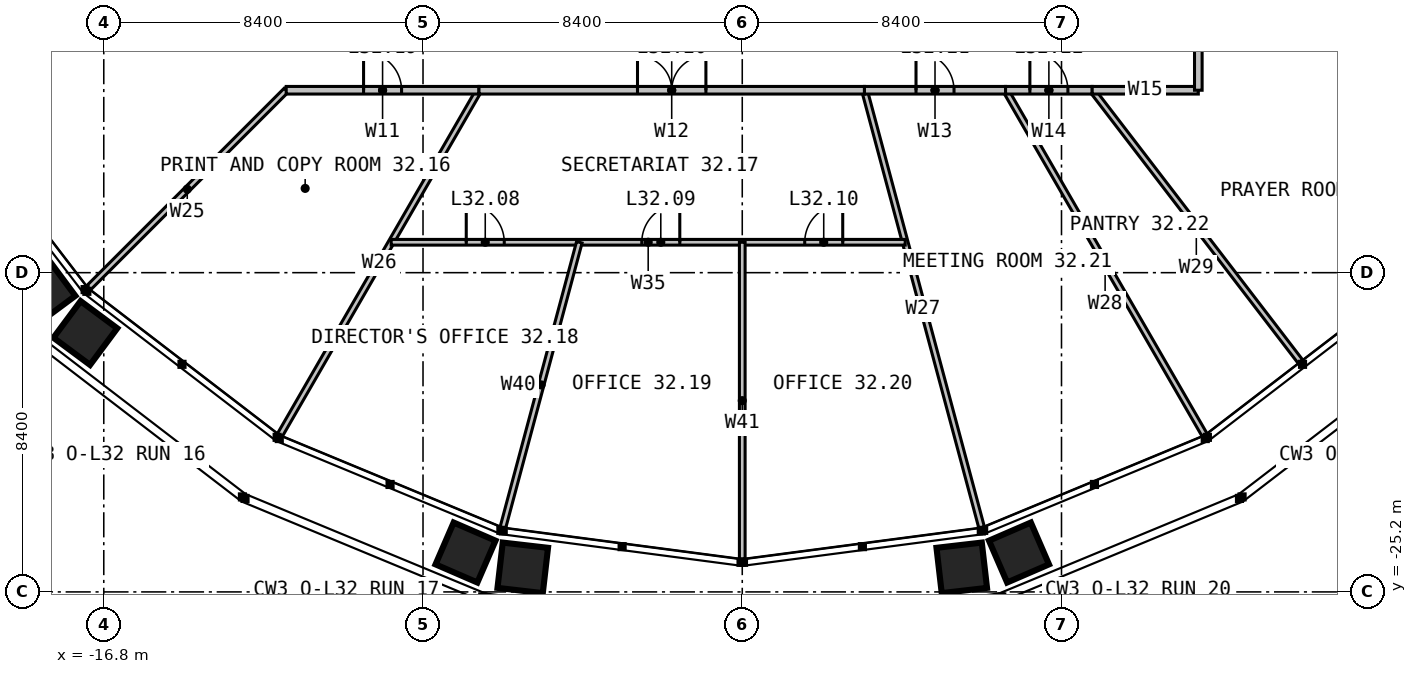
"""IFC4 building model, lengths in metres.
Left out: names, types, materials, properties, quantities, classifications, styles, units other than length and angle.
Written with IfcOpenShell. Run it as: python <this file> out.ifc"""

import sys

from ifc_helpers import new_model, si_unit, direction, frame, frame_2d, origin, place, context, subcontext, project, spatial, rectangle, extrude, element, fill, save


model = new_model("IFC4")
c1 = context("Model", 3, precision=1e-05, world=origin(), true_north=direction((0.0, 1.0)))
c2 = subcontext(c1, "Body", "Model", "MODEL_VIEW")
j1 = project(units=[si_unit("LENGTHUNIT", "METRE"), si_unit("PLANEANGLEUNIT", "RADIAN")], contexts=[c1])
p1 = place(None, origin())
s1 = spatial("IfcSite", under=j1, at=p1, CompositionType="ELEMENT")
p2 = place(p1, origin())
s2 = spatial("IfcBuilding", under=s1, at=p2, CompositionType="ELEMENT")
p3 = place(p2, frame((0.0, 0.0, 134.0)))
s3 = spatial("IfcBuildingStorey", under=s2, at=p3, CompositionType="ELEMENT", Elevation=134.0)
for number, where, z_axis, x_axis in (
    (1, (12.0, -6.928, 0.0), (0.0, 0.0, 1.0), (0.866, -0.5, 0.0)),
    (2, (-12.0, -6.928, 0.0), (0.0, 0.0, 1.0), (-0.866, -0.5, 0.0)),
):
    element("IfcWall", number, at=place(p3, frame(where, z_axis=z_axis, x_axis=x_axis)), inside=s3, PredefinedType="PARTITIONING", context=c2, shape_type="SweptSolid", body=[
        extrude(rectangle(XDim=10.478, YDim=0.15, at=frame_2d((5.239, 0.0))), origin(), (0.0, 0.0, 1.0), 2.79),
    ])
p4 = place(p3, frame((-12.0, -12.0, 0.0), z_axis=(0.0, 0.0, 1.0), x_axis=(-0.707106781187, -0.707106781187, 0.0)))
e3 = element("IfcWall", 3, at=p4, inside=s3, PredefinedType="PARTITIONING", context=c2, shape_type="SweptSolid", body=[
    extrude(rectangle(XDim=7.364, YDim=0.15, at=frame_2d((3.682, 0.0))), origin(), (0.0, 0.0, 1.0), 2.79),
])
p5 = place(p3, frame((-6.928, -12.0, 0.0), z_axis=(0.0, 0.0, 1.0), x_axis=(-0.49999340367, -0.866029212144, 0.0)))
e4 = element("IfcWall", 4, at=p5, inside=s3, PredefinedType="PARTITIONING", context=c2, shape_type="SweptSolid", body=[
    extrude(rectangle(XDim=10.478, YDim=0.15, at=frame_2d((5.239, 0.0))), origin(), (0.0, 0.0, 1.0), 2.79),
])
p6 = place(p3, frame((3.215, -12.0, 0.0), z_axis=(0.0, 0.0, 1.0), x_axis=(0.258817023816, -0.965926367889, 0.0)))
e5 = element("IfcWall", 5, at=p6, inside=s3, PredefinedType="PARTITIONING", context=c2, shape_type="SweptSolid", body=[
    extrude(rectangle(XDim=11.911, YDim=0.15, at=frame_2d((5.956, 0.0))), origin(), (0.0, 0.0, 1.0), 2.79),
])
p7 = place(p3, frame((6.928, -12.0, 0.0), z_axis=(0.0, 0.0, 1.0), x_axis=(0.49999340367, -0.866029212144, 0.0)))
e6 = element("IfcWall", 6, at=p7, inside=s3, PredefinedType="PARTITIONING", context=c2, shape_type="SweptSolid", body=[
    extrude(rectangle(XDim=10.478, YDim=0.15, at=frame_2d((5.239, 0.0))), origin(), (0.0, 0.0, 1.0), 2.79),
])
p8 = place(p3, frame((9.208, -12.0, 0.0), z_axis=(0.0, 0.0, 1.0), x_axis=(0.608761217002, -0.79335350297, 0.0)))
e7 = element("IfcWall", 7, at=p8, inside=s3, PredefinedType="PARTITIONING", context=c2, shape_type="SweptSolid", body=[
    extrude(rectangle(XDim=9.0, YDim=0.15, at=frame_2d((4.5, 0.0))), origin(), (0.0, 0.0, 1.0), 2.79),
])
p9 = place(p3, frame((-12.0, -12.0, 0.0), z_axis=(0.0, 0.0, 1.0), x_axis=(1.0, 0.0, 0.0)))
e8 = element("IfcWall", 8, at=p9, inside=s3, PredefinedType="PARTITIONING", context=c2, shape_type="SweptSolid", body=[
    extrude(rectangle(XDim=5.072, YDim=0.2, at=frame_2d((2.536, 0.0))), origin(), (0.0, 0.0, 1.0), 3.8),
])
p10 = place(p9, frame((2.036, 0.0, 0.0)))
e9 = element("IfcOpeningElement", 9, at=p10, cuts=e8, PredefinedType="OPENING", context=c2, shape_type="SweptSolid", body=[
    extrude(rectangle(XDim=1.0, YDim=2.2, at=frame_2d((0.5, 1.1))), frame((0.0, 0.11, 0.0), z_axis=(0.0, -1.0, 0.0), x_axis=(1.0, 0.0, 0.0)), (0.0, 0.0, 1.0), 0.22),
])
p11 = place(p3, frame((-9.238, -16.0, 0.0), z_axis=(0.0, 0.0, 1.0), x_axis=(1.0, 0.0, 0.0)))
e10 = element("IfcWall", 10, at=p11, inside=s3, PredefinedType="PARTITIONING", context=c2, shape_type="SweptSolid", body=[
    extrude(rectangle(XDim=13.525, YDim=0.15, at=frame_2d((6.762, 0.0))), origin(), (0.0, 0.0, 1.0), 2.79),
])
p12 = place(p11, frame((1.975, 0.0, 0.0)))
e11 = element("IfcOpeningElement", 11, at=p12, cuts=e10, PredefinedType="OPENING", context=c2, shape_type="SweptSolid", body=[
    extrude(rectangle(XDim=1.0, YDim=2.2, at=frame_2d((0.5, 1.1))), frame((0.0, 0.085, 0.0), z_axis=(0.0, -1.0, 0.0), x_axis=(1.0, 0.0, 0.0)), (0.0, 0.0, 1.0), 0.17),
])
p13 = place(p11, frame((6.594, 0.0, 0.0)))
e12 = element("IfcOpeningElement", 12, at=p13, cuts=e10, PredefinedType="OPENING", context=c2, shape_type="SweptSolid", body=[
    extrude(rectangle(XDim=1.0, YDim=2.2, at=frame_2d((0.5, 1.1))), frame((0.0, 0.085, 0.0), z_axis=(0.0, -1.0, 0.0), x_axis=(1.0, 0.0, 0.0)), (0.0, 0.0, 1.0), 0.17),
])
p14 = place(p11, frame((10.881, 0.0, 0.0)))
e13 = element("IfcOpeningElement", 13, at=p14, cuts=e10, PredefinedType="OPENING", context=c2, shape_type="SweptSolid", body=[
    extrude(rectangle(XDim=1.0, YDim=2.2, at=frame_2d((0.5, 1.1))), frame((0.0, 0.085, 0.0), z_axis=(0.0, -1.0, 0.0), x_axis=(1.0, 0.0, 0.0)), (0.0, 0.0, 1.0), 0.17),
])
p15 = place(p3, frame((-4.287, -16.0, 0.0), z_axis=(0.0, 0.0, 1.0), x_axis=(-0.25881827922, -0.965926031506, 0.0)))
e14 = element("IfcWall", 14, at=p15, inside=s3, PredefinedType="PARTITIONING", context=c2, shape_type="SweptSolid", body=[
    extrude(rectangle(XDim=7.77, YDim=0.15, at=frame_2d((3.885, 0.0))), origin(), (0.0, 0.0, 1.0), 2.79),
])
p16 = place(p3, frame((0.0, -16.0, 0.0), z_axis=(0.0, 0.0, 1.0), x_axis=(0.0, -1.0, 0.0)))
e15 = element("IfcWall", 15, at=p16, inside=s3, PredefinedType="PARTITIONING", context=c2, shape_type="SweptSolid", body=[
    extrude(rectangle(XDim=8.334, YDim=0.15, at=frame_2d((4.167, 0.0))), origin(), (0.0, 0.0, 1.0), 2.79),
])
p17 = place(p3, frame((-6.928, -12.0, 0.0), z_axis=(0.0, 0.0, 1.0), x_axis=(1.0, 0.0, 0.0)))
e16 = element("IfcWall", 16, at=p17, inside=s3, PredefinedType="PARTITIONING", context=c2, shape_type="SweptSolid", body=[
    extrude(rectangle(XDim=10.144, YDim=0.2, at=frame_2d((5.072, 0.0))), origin(), (0.0, 0.0, 1.0), 3.8),
])
p18 = place(p17, frame((4.172, 0.0, 0.0)))
e17 = element("IfcOpeningElement", 17, at=p18, cuts=e16, PredefinedType="OPENING", context=c2, shape_type="SweptSolid", body=[
    extrude(rectangle(XDim=1.8, YDim=2.2, at=frame_2d((0.9, 1.1))), frame((0.0, 0.11, 0.0), z_axis=(0.0, -1.0, 0.0), x_axis=(1.0, 0.0, 0.0)), (0.0, 0.0, 1.0), 0.22),
])
p19 = place(p3, frame((3.215, -12.0, 0.0), z_axis=(0.0, 0.0, 1.0), x_axis=(1.0, 0.0, 0.0)))
e18 = element("IfcWall", 18, at=p19, inside=s3, PredefinedType="PARTITIONING", context=c2, shape_type="SweptSolid", body=[
    extrude(rectangle(XDim=3.713, YDim=0.2, at=frame_2d((1.856, 0.0))), origin(), (0.0, 0.0, 1.0), 3.8),
])
p20 = place(p19, frame((1.356, 0.0, 0.0)))
e19 = element("IfcOpeningElement", 19, at=p20, cuts=e18, PredefinedType="OPENING", context=c2, shape_type="SweptSolid", body=[
    extrude(rectangle(XDim=1.0, YDim=2.2, at=frame_2d((0.5, 1.1))), frame((0.0, 0.11, 0.0), z_axis=(0.0, -1.0, 0.0), x_axis=(1.0, 0.0, 0.0)), (0.0, 0.0, 1.0), 0.22),
])
p21 = place(p3, frame((6.928, -12.0, 0.0), z_axis=(0.0, 0.0, 1.0), x_axis=(1.0, 0.0, 0.0)))
e20 = element("IfcWall", 20, at=p21, inside=s3, PredefinedType="PARTITIONING", context=c2, shape_type="SweptSolid", body=[
    extrude(rectangle(XDim=2.28, YDim=0.2, at=frame_2d((1.14, 0.0))), origin(), (0.0, 0.0, 1.0), 3.8),
])
p22 = place(p21, frame((0.64, 0.0, 0.0)))
e21 = element("IfcOpeningElement", 21, at=p22, cuts=e20, PredefinedType="OPENING", context=c2, shape_type="SweptSolid", body=[
    extrude(rectangle(XDim=1.0, YDim=2.2, at=frame_2d((0.5, 1.1))), frame((0.0, 0.11, 0.0), z_axis=(0.0, -1.0, 0.0), x_axis=(1.0, 0.0, 0.0)), (0.0, 0.0, 1.0), 0.22),
])
p23 = place(p3, frame((9.208, -12.0, 0.0), z_axis=(0.0, 0.0, 1.0), x_axis=(1.0, 0.0, 0.0)))
e22 = element("IfcWall", 22, at=p23, inside=s3, PredefinedType="PARTITIONING", context=c2, shape_type="SweptSolid", body=[
    extrude(rectangle(XDim=2.792, YDim=0.2, at=frame_2d((1.396, 0.0))), origin(), (0.0, 0.0, 1.0), 3.8),
])
p24 = place(p3, frame((12.0, -12.0, 0.0), z_axis=(0.0, 0.0, 1.0), x_axis=(0.0, 1.0, 0.0)))
e23 = element("IfcWall", 23, at=p24, inside=s3, PredefinedType="PARTITIONING", context=c2, shape_type="SweptSolid", body=[
    extrude(rectangle(XDim=5.072, YDim=0.2, at=frame_2d((2.536, 0.0))), origin(), (0.0, 0.0, 1.0), 3.8),
])
p25 = place(p24, frame((2.036, 0.0, 0.0)))
e24 = element("IfcOpeningElement", 24, at=p25, cuts=e23, PredefinedType="OPENING", context=c2, shape_type="SweptSolid", body=[
    extrude(rectangle(XDim=1.0, YDim=2.2, at=frame_2d((0.5, 1.1))), frame((0.0, 0.11, 0.0), z_axis=(0.0, -1.0, 0.0), x_axis=(1.0, 0.0, 0.0)), (0.0, 0.0, 1.0), 0.22),
])
p26 = place(p10, origin())
e25 = element("IfcDoor", 25, at=p26, inside=s3, OperationType="SINGLE_SWING_LEFT", PredefinedType="DOOR", context=c2, shape_type="SweptSolid", body=[
    extrude(rectangle(XDim=1.0, YDim=2.2, at=frame_2d((0.5, 1.1))), frame((0.0, 0.025, 0.0), z_axis=(0.0, -1.0, 0.0), x_axis=(1.0, 0.0, 0.0)), (0.0, 0.0, 1.0), 0.05),
])
fill(e9, e25)
p27 = place(p12, origin())
e26 = element("IfcDoor", 26, at=p27, inside=s3, OperationType="SINGLE_SWING_LEFT", PredefinedType="DOOR", context=c2, shape_type="SweptSolid", body=[
    extrude(rectangle(XDim=1.0, YDim=2.2, at=frame_2d((0.5, 1.1))), frame((0.0, 0.025, 0.0), z_axis=(0.0, -1.0, 0.0), x_axis=(1.0, 0.0, 0.0)), (0.0, 0.0, 1.0), 0.05),
])
fill(e11, e26)
p28 = place(p13, origin())
e27 = element("IfcDoor", 27, at=p28, inside=s3, OperationType="SINGLE_SWING_RIGHT", PredefinedType="DOOR", context=c2, shape_type="SweptSolid", body=[
    extrude(rectangle(XDim=1.0, YDim=2.2, at=frame_2d((0.5, 1.1))), frame((0.0, 0.025, 0.0), z_axis=(0.0, -1.0, 0.0), x_axis=(1.0, 0.0, 0.0)), (0.0, 0.0, 1.0), 0.05),
])
fill(e12, e27)
p29 = place(p14, origin())
e28 = element("IfcDoor", 28, at=p29, inside=s3, OperationType="SINGLE_SWING_RIGHT", PredefinedType="DOOR", context=c2, shape_type="SweptSolid", body=[
    extrude(rectangle(XDim=1.0, YDim=2.2, at=frame_2d((0.5, 1.1))), frame((0.0, 0.025, 0.0), z_axis=(0.0, -1.0, 0.0), x_axis=(1.0, 0.0, 0.0)), (0.0, 0.0, 1.0), 0.05),
])
fill(e13, e28)
p30 = place(p18, origin())
e29 = element("IfcDoor", 29, at=p30, inside=s3, OperationType="DOUBLE_DOOR_SINGLE_SWING", PredefinedType="DOOR", context=c2, shape_type="SweptSolid", body=[
    extrude(rectangle(XDim=1.8, YDim=2.2, at=frame_2d((0.9, 1.1))), frame((0.0, 0.025, 0.0), z_axis=(0.0, -1.0, 0.0), x_axis=(1.0, 0.0, 0.0)), (0.0, 0.0, 1.0), 0.05),
])
fill(e17, e29)
p31 = place(p20, origin())
e30 = element("IfcDoor", 30, at=p31, inside=s3, OperationType="SINGLE_SWING_LEFT", PredefinedType="DOOR", context=c2, shape_type="SweptSolid", body=[
    extrude(rectangle(XDim=1.0, YDim=2.2, at=frame_2d((0.5, 1.1))), frame((0.0, 0.025, 0.0), z_axis=(0.0, -1.0, 0.0), x_axis=(1.0, 0.0, 0.0)), (0.0, 0.0, 1.0), 0.05),
])
fill(e19, e30)
p32 = place(p22, origin())
e31 = element("IfcDoor", 31, at=p32, inside=s3, OperationType="SINGLE_SWING_LEFT", PredefinedType="DOOR", context=c2, shape_type="SweptSolid", body=[
    extrude(rectangle(XDim=1.0, YDim=2.2, at=frame_2d((0.5, 1.1))), frame((0.0, 0.025, 0.0), z_axis=(0.0, -1.0, 0.0), x_axis=(1.0, 0.0, 0.0)), (0.0, 0.0, 1.0), 0.05),
])
fill(e21, e31)
save(model, sys.argv[1])
